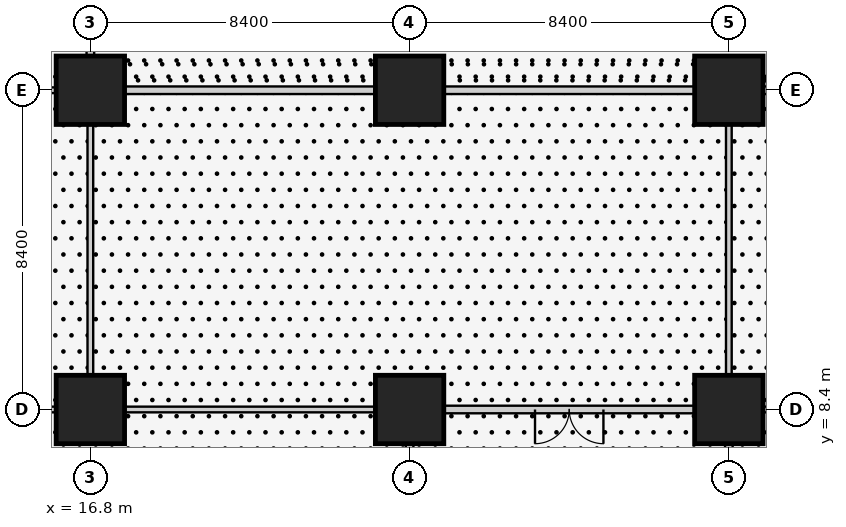
"""IFC4 building model, lengths in metres.
Left out: names, types, materials, properties, quantities, classifications, styles, units other than length and angle.
Written with IfcOpenShell. Run it as: python <this file> out.ifc"""

import sys

from ifc_helpers import new_model, si_unit, direction, frame, frame_2d, origin, origin_2d, place, context, subcontext, project, spatial, rectangle, extrude, element, fill, save


model = new_model("IFC4")
c1 = context("Model", 3, precision=1e-05, world=origin(), true_north=direction((0.0, 1.0)))
c2 = subcontext(c1, "Body", "Model", "MODEL_VIEW")
j1 = project(units=[si_unit("LENGTHUNIT", "METRE"), si_unit("PLANEANGLEUNIT", "RADIAN")], contexts=[c1])
p1 = place(None, origin())
s1 = spatial("IfcSite", under=j1, at=p1, CompositionType="ELEMENT")
p2 = place(p1, origin())
s2 = spatial("IfcBuilding", under=s1, at=p2, CompositionType="ELEMENT")
p3 = place(p2, frame((0.0, 0.0, 6.0)))
s3 = spatial("IfcBuildingStorey", under=s2, at=p3, CompositionType="ELEMENT", Elevation=6.0)
for number, where, z_axis, x_axis in (
    (1, (16.8, 8.4, 0.0), (0.0, 0.0, 1.0), (1.0, 0.0, 0.0)),
    (2, (16.8, 16.8, 0.0), (0.0, 0.0, 1.0), (1.0, 0.0, 0.0)),
    (3, (25.2, 8.4, 0.0), (0.0, 0.0, 1.0), (1.0, 0.0, 0.0)),
    (4, (25.2, 16.8, 0.0), (0.0, 0.0, 1.0), (1.0, 0.0, 0.0)),
    (5, (33.6, 8.4, 0.0), (0.0, 0.0, 1.0), (1.0, 0.0, 0.0)),
    (6, (33.6, 16.8, 0.0), (0.0, 0.0, 1.0), (1.0, 0.0, 0.0)),
):
    element("IfcColumn", number, at=place(p3, frame(where, z_axis=z_axis, x_axis=x_axis)), inside=s3, PredefinedType="COLUMN", context=c2, shape_type="SweptSolid", body=[
        extrude(rectangle(XDim=1.8, YDim=1.8, at=origin_2d()), origin(), (0.0, 0.0, 1.0), 4.5),
    ])
for number, where, z_axis, x_axis in (
    (7, (25.2, 0.9, 0.0), (0.0, 0.0, 1.0), (0.0, 1.0, 0.0)),
    (8, (33.6, 7.5, 0.0), (0.0, 0.0, 1.0), (0.0, -1.0, 0.0)),
):
    element("IfcWall", number, at=place(p3, frame(where, z_axis=z_axis, x_axis=x_axis)), inside=s3, PredefinedType="PARTITIONING", context=c2, shape_type="SweptSolid", body=[
        extrude(rectangle(XDim=6.6, YDim=0.2, at=frame_2d((3.3, 0.0))), origin(), (0.0, 0.0, 1.0), 3.543),
    ])
p4 = place(p3, frame((26.1, 8.4, 0.0), z_axis=(0.0, 0.0, 1.0), x_axis=(1.0, 0.0, 0.0)))
e9 = element("IfcWall", 9, at=p4, inside=s3, PredefinedType="PARTITIONING", context=c2, shape_type="SweptSolid", body=[
    extrude(rectangle(XDim=6.6, YDim=0.2, at=frame_2d((3.3, 0.0))), origin(), (0.0, 0.0, 1.0), 3.543),
])
p5 = place(p4, frame((2.4, 0.0, 0.0)))
e10 = element("IfcOpeningElement", 10, at=p5, cuts=e9, PredefinedType="OPENING", context=c2, shape_type="SweptSolid", body=[
    extrude(rectangle(XDim=1.8, YDim=2.4, at=frame_2d((0.9, 1.2))), frame((0.0, 0.11, 0.0), z_axis=(0.0, -1.0, 0.0), x_axis=(1.0, 0.0, 0.0)), (0.0, 0.0, 1.0), 0.22),
])
p6 = place(p3, frame((24.3, 16.8, 0.0), z_axis=(0.0, 0.0, 1.0), x_axis=(-1.0, 0.0, 0.0)))
e11 = element("IfcWall", 11, at=p6, inside=s3, PredefinedType="PARTITIONING", context=c2, shape_type="SweptSolid", body=[
    extrude(rectangle(XDim=6.6, YDim=0.2, at=frame_2d((3.3, 0.0))), origin(), (0.0, 0.0, 1.0), 3.543),
])
p7 = place(p3, frame((32.7, 16.8, 0.0), z_axis=(0.0, 0.0, 1.0), x_axis=(-1.0, 0.0, 0.0)))
e12 = element("IfcWall", 12, at=p7, inside=s3, PredefinedType="PARTITIONING", context=c2, shape_type="SweptSolid", body=[
    extrude(rectangle(XDim=6.6, YDim=0.2, at=frame_2d((3.3, 0.0))), origin(), (0.0, 0.0, 1.0), 3.543),
])
p8 = place(p3, frame((38.3, 16.8, 0.0), z_axis=(0.0, 0.0, 1.0), x_axis=(-1.0, 0.0, 0.0)))
e13 = element("IfcWall", 13, at=p8, inside=s3, PredefinedType="PARTITIONING", context=c2, shape_type="SweptSolid", body=[
    extrude(rectangle(XDim=3.8, YDim=0.2, at=frame_2d((1.9, 0.0))), origin(), (0.0, 0.0, 1.0), 3.543),
])
p9 = place(p3, frame((16.8, 17.7, 0.0), z_axis=(0.0, 0.0, 1.0), x_axis=(0.0, 1.0, 0.0)))
e14 = element("IfcWall", 14, at=p9, inside=s3, PredefinedType="PARTITIONING", context=c2, shape_type="SweptSolid", body=[
    extrude(rectangle(XDim=6.6, YDim=0.2, at=frame_2d((3.3, 0.0))), origin(), (0.0, 0.0, 1.0), 3.543),
])
p10 = place(p3, frame((11.7, 8.4, 0.0), z_axis=(0.0, 0.0, 1.0), x_axis=(1.0, 0.0, 0.0)))
e15 = element("IfcWall", 15, at=p10, inside=s3, PredefinedType="PARTITIONING", context=c2, shape_type="SweptSolid", body=[
    extrude(rectangle(XDim=4.2, YDim=0.15, at=frame_2d((2.1, 0.0))), origin(), (0.0, 0.0, 1.0), 3.543),
])
for number, where, z_axis, x_axis in (
    (16, (17.7, 8.4, 0.0), (0.0, 0.0, 1.0), (1.0, 0.0, 0.0)),
    (17, (34.5, 8.4, 0.0), (0.0, 0.0, 1.0), (1.0, 0.0, 0.0)),
):
    element("IfcWall", number, at=place(p3, frame(where, z_axis=z_axis, x_axis=x_axis)), inside=s3, PredefinedType="PARTITIONING", context=c2, shape_type="SweptSolid", body=[
        extrude(rectangle(XDim=6.6, YDim=0.15, at=frame_2d((3.3, 0.0))), origin(), (0.0, 0.0, 1.0), 3.543),
    ])
p11 = place(p3, frame((16.8, 15.9, 0.0), z_axis=(0.0, 0.0, 1.0), x_axis=(0.0, -1.0, 0.0)))
e18 = element("IfcWall", 18, at=p11, inside=s3, PredefinedType="PARTITIONING", context=c2, shape_type="SweptSolid", body=[
    extrude(rectangle(XDim=6.6, YDim=0.15, at=frame_2d((3.3, 0.0))), origin(), (0.0, 0.0, 1.0), 3.543),
])
p12 = place(p3, frame((11.7, 16.8, 0.0), z_axis=(0.0, 0.0, 1.0), x_axis=(1.0, 0.0, 0.0)))
e19 = element("IfcWall", 19, at=p12, inside=s3, PredefinedType="PARTITIONING", context=c2, shape_type="SweptSolid", body=[
    extrude(rectangle(XDim=4.2, YDim=0.15, at=frame_2d((2.1, 0.0))), origin(), (0.0, 0.0, 1.0), 3.543),
])
p13 = place(p3, frame((33.6, 15.9, 0.0), z_axis=(0.0, 0.0, 1.0), x_axis=(0.0, -1.0, 0.0)))
e20 = element("IfcWall", 20, at=p13, inside=s3, PredefinedType="PARTITIONING", context=c2, shape_type="SweptSolid", body=[
    extrude(rectangle(XDim=6.6, YDim=0.15, at=frame_2d((3.3, 0.0))), origin(), (0.0, 0.0, 1.0), 3.543),
])
p14 = place(p5, frame((1.8, 0.0, 0.0), z_axis=(0.0, 0.0, 1.0), x_axis=(-1.0, 0.0, 0.0)))
e21 = element("IfcDoor", 21, at=p14, inside=s3, OperationType="DOUBLE_DOOR_SINGLE_SWING", PredefinedType="DOOR", context=c2, shape_type="SweptSolid", body=[
    extrude(rectangle(XDim=1.8, YDim=2.4, at=frame_2d((0.9, 1.2))), frame((0.0, 0.025, 0.0), z_axis=(0.0, -1.0, 0.0), x_axis=(1.0, 0.0, 0.0)), (0.0, 0.0, 1.0), 0.05),
])
fill(e10, e21)
save(model, sys.argv[1])
